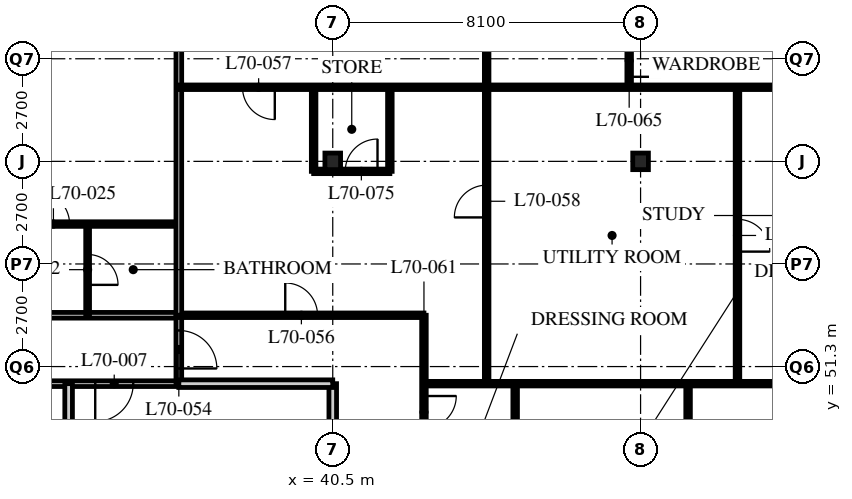
"""IFC4 building model, lengths in metres.
Left out: names, types, materials, properties, quantities, classifications, styles, units other than length and angle.
Written with IfcOpenShell. Run it as: python <this file> out.ifc"""

import sys

from ifc_helpers import new_model, si_unit, direction, frame, frame_2d, origin, origin_2d, place, context, subcontext, project, spatial, rectangle, i_section, extrude, element, fill, save


model = new_model("IFC4")
c1 = context("Model", 3, precision=1e-05, world=origin(), true_north=direction((0.0, 1.0)))
c2 = subcontext(c1, "Body", "Model", "MODEL_VIEW")
j1 = project(units=[si_unit("LENGTHUNIT", "METRE"), si_unit("PLANEANGLEUNIT", "RADIAN")], contexts=[c1])
p1 = place(None, origin())
s1 = spatial("IfcSite", under=j1, at=p1, CompositionType="ELEMENT")
p2 = place(p1, origin())
s2 = spatial("IfcBuilding", under=s1, at=p2, CompositionType="ELEMENT")
p3 = place(p2, frame((0.0, 0.0, 273.6)))
s3 = spatial("IfcBuildingStorey", under=s2, at=p3, CompositionType="ELEMENT", Elevation=273.6)
for number, where, z_axis, x_axis in (
    (1, (40.5, 56.7, 0.0), (0.0, 0.0, 1.0), (1.0, 0.0, 0.0)),
    (2, (48.6, 56.7, 0.0), (0.0, 0.0, 1.0), (1.0, 0.0, 0.0)),
):
    element("IfcColumn", number, at=place(p3, frame(where, z_axis=z_axis, x_axis=x_axis)), inside=s3, PredefinedType="COLUMN", context=c2, shape_type="SweptSolid", body=[
        extrude(i_section(OverallWidth=0.412, OverallDepth=0.437, WebThickness=0.036, FlangeThickness=0.058, FilletRadius=0.015, at=origin_2d()), origin(), (0.0, 0.0, 1.0), 3.9),
    ])
p4 = place(p3, frame((12.15, 52.65, 0.0), z_axis=(0.0, 0.0, 1.0), x_axis=(1.0, 0.0, 0.0)))
e3 = element("IfcWall", 3, at=p4, inside=s3, PredefinedType="PARTITIONING", context=c2, shape_type="SweptSolid", body=[
    extrude(rectangle(XDim=24.3, YDim=0.15, at=frame_2d((12.15, 0.0))), origin(), (0.0, 0.0, 1.0), 3.69),
])
p5 = place(p4, frame((6.4, 0.0, 0.0)))
e4 = element("IfcOpeningElement", 4, at=p5, cuts=e3, PredefinedType="OPENING", context=c2, shape_type="SweptSolid", body=[
    extrude(rectangle(XDim=1.0, YDim=2.1, at=frame_2d((0.5, 1.05))), frame((0.0, 0.085, 0.0), z_axis=(0.0, -1.0, 0.0), x_axis=(1.0, 0.0, 0.0)), (0.0, 0.0, 1.0), 0.17),
])
p6 = place(p4, frame((8.5, 0.0, 0.0)))
e5 = element("IfcOpeningElement", 5, at=p6, cuts=e3, PredefinedType="OPENING", context=c2, shape_type="SweptSolid", body=[
    extrude(rectangle(XDim=1.0, YDim=2.1, at=frame_2d((0.5, 1.05))), frame((0.0, 0.085, 0.0), z_axis=(0.0, -1.0, 0.0), x_axis=(1.0, 0.0, 0.0)), (0.0, 0.0, 1.0), 0.17),
])
p7 = place(p4, frame((16.6, 0.0, 0.0)))
e6 = element("IfcOpeningElement", 6, at=p7, cuts=e3, PredefinedType="OPENING", context=c2, shape_type="SweptSolid", body=[
    extrude(rectangle(XDim=1.0, YDim=2.1, at=frame_2d((0.5, 1.05))), frame((0.0, 0.085, 0.0), z_axis=(0.0, -1.0, 0.0), x_axis=(1.0, 0.0, 0.0)), (0.0, 0.0, 1.0), 0.17),
])
p8 = place(p4, frame((1.525, 0.0, 0.0)))
e7 = element("IfcOpeningElement", 7, at=p8, cuts=e3, PredefinedType="OPENING", context=c2, shape_type="SweptSolid", body=[
    extrude(rectangle(XDim=1.0, YDim=2.1, at=frame_2d((0.5, 1.05))), frame((0.0, 0.085, 0.0), z_axis=(0.0, -1.0, 0.0), x_axis=(1.0, 0.0, 0.0)), (0.0, 0.0, 1.0), 0.17),
])
p9 = place(p3, frame((29.56, 50.85, 0.0), z_axis=(0.0, 0.0, 1.0), x_axis=(1.0, 0.0, 0.0)))
e8 = element("IfcWall", 8, at=p9, inside=s3, PredefinedType="PARTITIONING", context=c2, shape_type="SweptSolid", body=[
    extrude(rectangle(XDim=6.89, YDim=0.15, at=frame_2d((3.445, 0.0))), origin(), (0.0, 0.0, 1.0), 3.69),
])
p10 = place(p9, frame((1.49, 0.0, 0.0)))
e9 = element("IfcOpeningElement", 9, at=p10, cuts=e8, PredefinedType="OPENING", context=c2, shape_type="SweptSolid", body=[
    extrude(rectangle(XDim=1.0, YDim=2.1, at=frame_2d((0.5, 1.05))), frame((0.0, 0.085, 0.0), z_axis=(0.0, -1.0, 0.0), x_axis=(1.0, 0.0, 0.0)), (0.0, 0.0, 1.0), 0.17),
])
p11 = place(p9, frame((4.69, 0.0, 0.0)))
e10 = element("IfcOpeningElement", 10, at=p11, cuts=e8, PredefinedType="OPENING", context=c2, shape_type="SweptSolid", body=[
    extrude(rectangle(XDim=1.0, YDim=2.1, at=frame_2d((0.5, 1.05))), frame((0.0, 0.085, 0.0), z_axis=(0.0, -1.0, 0.0), x_axis=(1.0, 0.0, 0.0)), (0.0, 0.0, 1.0), 0.17),
])
p12 = place(p3, frame((33.55, 50.85, 0.0), z_axis=(0.0, 0.0, 1.0), x_axis=(0.0, -1.0, 0.0)))
e11 = element("IfcWall", 11, at=p12, inside=s3, PredefinedType="SOLIDWALL", context=c2, shape_type="SweptSolid", body=[
    extrude(rectangle(XDim=3.0, YDim=0.2, at=frame_2d((1.5, 0.0))), origin(), (0.0, 0.0, 1.0), 3.69),
])
p13 = place(p3, frame((36.45, 50.85, 0.0), z_axis=(0.0, 0.0, 1.0), x_axis=(0.0, 1.0, 0.0)))
e12 = element("IfcWall", 12, at=p13, inside=s3, PredefinedType="PARTITIONING", context=c2, shape_type="SweptSolid", body=[
    extrude(rectangle(XDim=1.8, YDim=0.15, at=frame_2d((0.9, 0.0))), origin(), (0.0, 0.0, 1.0), 3.69),
])
p14 = place(p13, frame((0.4, 0.0, 0.0)))
e13 = element("IfcOpeningElement", 13, at=p14, cuts=e12, PredefinedType="OPENING", context=c2, shape_type="SweptSolid", body=[
    extrude(rectangle(XDim=1.0, YDim=2.1, at=frame_2d((0.5, 1.05))), frame((0.0, 0.085, 0.0), z_axis=(0.0, -1.0, 0.0), x_axis=(1.0, 0.0, 0.0)), (0.0, 0.0, 1.0), 0.17),
])
p15 = place(p3, frame((40.5, 40.5, 0.0), z_axis=(0.0, 0.0, 1.0), x_axis=(0.0, 1.0, 0.0)))
e14 = element("IfcWall", 14, at=p15, inside=s3, PredefinedType="SOLIDWALL", context=c2, shape_type="SweptSolid", body=[
    extrude(rectangle(XDim=10.35, YDim=0.2, at=frame_2d((5.175, 0.0))), origin(), (0.0, 0.0, 1.0), 3.078),
])
p16 = place(p3, frame((20.25, 55.05, 0.0), z_axis=(0.0, 0.0, 1.0), x_axis=(1.0, 0.0, 0.0)))
e15 = element("IfcWall", 15, at=p16, inside=s3, PredefinedType="PARTITIONING", context=c2, shape_type="SweptSolid", body=[
    extrude(rectangle(XDim=16.2, YDim=0.12, at=frame_2d((8.1, 0.0))), origin(), (0.0, 0.0, 1.0), 3.69),
])
p17 = place(p16, frame((0.975, 0.0, 0.0)))
e16 = element("IfcOpeningElement", 16, at=p17, cuts=e15, PredefinedType="OPENING", context=c2, shape_type="SweptSolid", body=[
    extrude(rectangle(XDim=0.85, YDim=2.1, at=frame_2d((0.425, 1.05))), frame((0.0, 0.07, 0.0), z_axis=(0.0, -1.0, 0.0), x_axis=(1.0, 0.0, 0.0)), (0.0, 0.0, 1.0), 0.14),
])
p18 = place(p16, frame((4.375, 0.0, 0.0)))
e17 = element("IfcOpeningElement", 17, at=p18, cuts=e15, PredefinedType="OPENING", context=c2, shape_type="SweptSolid", body=[
    extrude(rectangle(XDim=0.85, YDim=2.1, at=frame_2d((0.425, 1.05))), frame((0.0, 0.07, 0.0), z_axis=(0.0, -1.0, 0.0), x_axis=(1.0, 0.0, 0.0)), (0.0, 0.0, 1.0), 0.14),
])
p19 = place(p16, frame((9.075, 0.0, 0.0)))
e18 = element("IfcOpeningElement", 18, at=p19, cuts=e15, PredefinedType="OPENING", context=c2, shape_type="SweptSolid", body=[
    extrude(rectangle(XDim=0.85, YDim=2.1, at=frame_2d((0.425, 1.05))), frame((0.0, 0.07, 0.0), z_axis=(0.0, -1.0, 0.0), x_axis=(1.0, 0.0, 0.0)), (0.0, 0.0, 1.0), 0.14),
])
p20 = place(p16, frame((12.475, 0.0, 0.0)))
e19 = element("IfcOpeningElement", 19, at=p20, cuts=e15, PredefinedType="OPENING", context=c2, shape_type="SweptSolid", body=[
    extrude(rectangle(XDim=0.85, YDim=2.1, at=frame_2d((0.425, 1.05))), frame((0.0, 0.07, 0.0), z_axis=(0.0, -1.0, 0.0), x_axis=(1.0, 0.0, 0.0)), (0.0, 0.0, 1.0), 0.14),
])
p21 = place(p3, frame((34.05, 52.65, 0.0), z_axis=(0.0, 0.0, 1.0), x_axis=(0.0, 1.0, 0.0)))
e20 = element("IfcWall", 20, at=p21, inside=s3, PredefinedType="PARTITIONING", context=c2, shape_type="SweptSolid", body=[
    extrude(rectangle(XDim=2.4, YDim=0.1, at=frame_2d((1.2, 0.0))), origin(), (0.0, 0.0, 1.0), 3.69),
])
p22 = place(p21, frame((0.8, 0.0, 0.0)))
e21 = element("IfcOpeningElement", 21, at=p22, cuts=e20, PredefinedType="OPENING", context=c2, shape_type="SweptSolid", body=[
    extrude(rectangle(XDim=0.8, YDim=2.1, at=frame_2d((0.4, 1.05))), frame((0.0, 0.06, 0.0), z_axis=(0.0, -1.0, 0.0), x_axis=(1.0, 0.0, 0.0)), (0.0, 0.0, 1.0), 0.12),
])
p23 = place(p3, frame((42.9, 52.65, 0.0), z_axis=(0.0, 0.0, 1.0), x_axis=(0.0, -1.0, 0.0)))
e22 = element("IfcWall", 22, at=p23, inside=s3, PredefinedType="PARTITIONING", context=c2, shape_type="SweptSolid", body=[
    extrude(rectangle(XDim=12.15, YDim=0.12, at=frame_2d((6.075, 0.0))), origin(), (0.0, 0.0, 1.0), 3.69),
])
p24 = place(p23, frame((2.125, 0.0, 0.0)))
e23 = element("IfcOpeningElement", 23, at=p24, cuts=e22, PredefinedType="OPENING", context=c2, shape_type="SweptSolid", body=[
    extrude(rectangle(XDim=0.85, YDim=2.1, at=frame_2d((0.425, 1.05))), frame((0.0, 0.07, 0.0), z_axis=(0.0, -1.0, 0.0), x_axis=(1.0, 0.0, 0.0)), (0.0, 0.0, 1.0), 0.14),
])
p25 = place(p23, frame((8.425, 0.0, 0.0)))
e24 = element("IfcOpeningElement", 24, at=p25, cuts=e22, PredefinedType="OPENING", context=c2, shape_type="SweptSolid", body=[
    extrude(rectangle(XDim=0.85, YDim=2.1, at=frame_2d((0.425, 1.05))), frame((0.0, 0.07, 0.0), z_axis=(0.0, -1.0, 0.0), x_axis=(1.0, 0.0, 0.0)), (0.0, 0.0, 1.0), 0.14),
])
p26 = place(p3, frame((36.45, 52.65, 0.0), z_axis=(0.0, 0.0, 1.0), x_axis=(1.0, 0.0, 0.0)))
e25 = element("IfcWall", 25, at=p26, inside=s3, PredefinedType="PARTITIONING", context=c2, shape_type="SweptSolid", body=[
    extrude(rectangle(XDim=6.45, YDim=0.12, at=frame_2d((3.225, 0.0))), origin(), (0.0, 0.0, 1.0), 3.69),
])
p27 = place(p26, frame((2.8, 0.0, 0.0)))
e26 = element("IfcOpeningElement", 26, at=p27, cuts=e25, PredefinedType="OPENING", context=c2, shape_type="SweptSolid", body=[
    extrude(rectangle(XDim=0.85, YDim=2.1, at=frame_2d((0.425, 1.05))), frame((0.0, 0.07, 0.0), z_axis=(0.0, -1.0, 0.0), x_axis=(1.0, 0.0, 0.0)), (0.0, 0.0, 1.0), 0.14),
])
p28 = place(p3, frame((36.45, 50.85, 0.0), z_axis=(0.0, 0.0, 1.0), x_axis=(1.0, 0.0, 0.0)))
e27 = element("IfcWall", 27, at=p28, inside=s3, PredefinedType="SOLIDWALL", context=c2, shape_type="SweptSolid", body=[
    extrude(rectangle(XDim=4.05, YDim=0.2, at=frame_2d((2.025, 0.0))), origin(), (0.0, 0.0, 1.0), 3.69),
])
p29 = place(p3, frame((42.9, 50.85, 0.0), z_axis=(0.0, 0.0, 1.0), x_axis=(1.0, 0.0, 0.0)))
e28 = element("IfcWall", 28, at=p29, inside=s3, PredefinedType="PARTITIONING", context=c2, shape_type="SweptSolid", body=[
    extrude(rectangle(XDim=13.5, YDim=0.12, at=frame_2d((6.75, 0.0))), origin(), (0.0, 0.0, 1.0), 3.69),
])
p30 = place(p3, frame((36.45, 64.5, 0.0), z_axis=(0.0, 0.0, 1.0), x_axis=(0.0, -1.0, 0.0)))
e29 = element("IfcWall", 29, at=p30, inside=s3, PredefinedType="PARTITIONING", context=c2, shape_type="SweptSolid", body=[
    extrude(rectangle(XDim=11.85, YDim=0.15, at=frame_2d((5.925, 0.0))), origin(), (0.0, 0.0, 1.0), 3.69),
])
p31 = place(p3, frame((36.45, 58.65, 0.0), z_axis=(0.0, 0.0, 1.0), x_axis=(1.0, 0.0, 0.0)))
e30 = element("IfcWall", 30, at=p31, inside=s3, PredefinedType="PARTITIONING", context=c2, shape_type="SweptSolid", body=[
    extrude(rectangle(XDim=15.9, YDim=0.12, at=frame_2d((7.95, 0.0))), origin(), (0.0, 0.0, 1.0), 3.69),
])
p32 = place(p31, frame((1.675, 0.0, 0.0)))
e31 = element("IfcOpeningElement", 31, at=p32, cuts=e30, PredefinedType="OPENING", context=c2, shape_type="SweptSolid", body=[
    extrude(rectangle(XDim=0.85, YDim=2.1, at=frame_2d((0.425, 1.05))), frame((0.0, 0.07, 0.0), z_axis=(0.0, -1.0, 0.0), x_axis=(1.0, 0.0, 0.0)), (0.0, 0.0, 1.0), 0.14),
])
p33 = place(p3, frame((44.55, 64.5, 0.0), z_axis=(0.0, 0.0, 1.0), x_axis=(0.0, -1.0, 0.0)))
e32 = element("IfcWall", 32, at=p33, inside=s3, PredefinedType="PARTITIONING", context=c2, shape_type="SweptSolid", body=[
    extrude(rectangle(XDim=13.65, YDim=0.12, at=frame_2d((6.825, 0.0))), origin(), (0.0, 0.0, 1.0), 3.69),
])
p34 = place(p33, frame((8.425, 0.0, 0.0)))
e33 = element("IfcOpeningElement", 33, at=p34, cuts=e32, PredefinedType="OPENING", context=c2, shape_type="SweptSolid", body=[
    extrude(rectangle(XDim=0.85, YDim=2.1, at=frame_2d((0.425, 1.05))), frame((0.0, 0.07, 0.0), z_axis=(0.0, -1.0, 0.0), x_axis=(1.0, 0.0, 0.0)), (0.0, 0.0, 1.0), 0.14),
])
p35 = place(p33, frame((2.5, 0.0, 0.0)))
e34 = element("IfcOpeningElement", 34, at=p35, cuts=e32, PredefinedType="OPENING", context=c2, shape_type="SweptSolid", body=[
    extrude(rectangle(XDim=0.85, YDim=2.1, at=frame_2d((0.425, 1.05))), frame((0.0, 0.07, 0.0), z_axis=(0.0, -1.0, 0.0), x_axis=(1.0, 0.0, 0.0)), (0.0, 0.0, 1.0), 0.14),
])
p36 = place(p3, frame((48.3, 58.65, 0.0), z_axis=(0.0, 0.0, 1.0), x_axis=(0.0, 1.0, 0.0)))
e35 = element("IfcWall", 35, at=p36, inside=s3, PredefinedType="PARTITIONING", context=c2, shape_type="SweptSolid", body=[
    extrude(rectangle(XDim=1.8, YDim=0.12, at=frame_2d((0.9, 0.0))), origin(), (0.0, 0.0, 1.0), 3.69),
])
p37 = place(p36, frame((0.275, 0.0, 0.0)))
e36 = element("IfcOpeningElement", 36, at=p37, cuts=e35, PredefinedType="OPENING", context=c2, shape_type="SweptSolid", body=[
    extrude(rectangle(XDim=0.85, YDim=2.1, at=frame_2d((0.425, 1.05))), frame((0.0, 0.07, 0.0), z_axis=(0.0, -1.0, 0.0), x_axis=(1.0, 0.0, 0.0)), (0.0, 0.0, 1.0), 0.14),
])
p38 = place(p3, frame((45.3, 50.85, 0.0), z_axis=(0.0, 0.0, 1.0), x_axis=(0.0, -1.0, 0.0)))
e37 = element("IfcWall", 37, at=p38, inside=s3, PredefinedType="PARTITIONING", context=c2, shape_type="SweptSolid", body=[
    extrude(rectangle(XDim=4.01, YDim=0.12, at=frame_2d((2.005, 0.0))), origin(), (0.0, 0.0, 1.0), 3.69),
])
p39 = place(p38, frame((2.885, 0.0, 0.0)))
e38 = element("IfcOpeningElement", 38, at=p39, cuts=e37, PredefinedType="OPENING", context=c2, shape_type="SweptSolid", body=[
    extrude(rectangle(XDim=0.85, YDim=2.1, at=frame_2d((0.425, 1.05))), frame((0.0, 0.07, 0.0), z_axis=(0.0, -1.0, 0.0), x_axis=(1.0, 0.0, 0.0)), (0.0, 0.0, 1.0), 0.14),
])
p40 = place(p3, frame((51.15, 50.85, 0.0), z_axis=(0.0, 0.0, 1.0), x_axis=(0.0, 1.0, 0.0)))
e39 = element("IfcWall", 39, at=p40, inside=s3, PredefinedType="PARTITIONING", context=c2, shape_type="SweptSolid", body=[
    extrude(rectangle(XDim=7.8, YDim=0.12, at=frame_2d((3.9, 0.0))), origin(), (0.0, 0.0, 1.0), 3.69),
])
p41 = place(p40, frame((3.475, 0.0, 0.0)))
e40 = element("IfcOpeningElement", 40, at=p41, cuts=e39, PredefinedType="OPENING", context=c2, shape_type="SweptSolid", body=[
    extrude(rectangle(XDim=0.85, YDim=2.1, at=frame_2d((0.425, 1.05))), frame((0.0, 0.07, 0.0), z_axis=(0.0, -1.0, 0.0), x_axis=(1.0, 0.0, 0.0)), (0.0, 0.0, 1.0), 0.14),
])
p42 = place(p3, frame((49.85, 44.55, 0.0), z_axis=(0.0, 0.0, 1.0), x_axis=(0.0, 1.0, 0.0)))
e41 = element("IfcWall", 41, at=p42, inside=s3, PredefinedType="PARTITIONING", context=c2, shape_type="SweptSolid", body=[
    extrude(rectangle(XDim=6.3, YDim=0.12, at=frame_2d((3.15, 0.0))), origin(), (0.0, 0.0, 1.0), 3.69),
])
p43 = place(p42, frame((2.725, 0.0, 0.0)))
e42 = element("IfcOpeningElement", 42, at=p43, cuts=e41, PredefinedType="OPENING", context=c2, shape_type="SweptSolid", body=[
    extrude(rectangle(XDim=0.85, YDim=2.1, at=frame_2d((0.425, 1.05))), frame((0.0, 0.07, 0.0), z_axis=(0.0, -1.0, 0.0), x_axis=(1.0, 0.0, 0.0)), (0.0, 0.0, 1.0), 0.14),
])
for number, where, z_axis, x_axis in (
    (43, (39.997, 58.65, 0.0), (0.0, 0.0, 1.0), (0.0, -1.0, 0.0)),
    (44, (42.003, 58.65, 0.0), (0.0, 0.0, 1.0), (0.0, -1.0, 0.0)),
):
    element("IfcWall", number, at=place(p3, frame(where, z_axis=z_axis, x_axis=x_axis)), inside=s3, PredefinedType="PARTITIONING", context=c2, shape_type="SweptSolid", body=[
        extrude(rectangle(XDim=2.213, YDim=0.12, at=frame_2d((1.106, 0.0))), origin(), (0.0, 0.0, 1.0), 3.69),
    ])
p44 = place(p3, frame((39.997, 56.437, 0.0), z_axis=(0.0, 0.0, 1.0), x_axis=(1.0, 0.0, 0.0)))
e45 = element("IfcWall", 45, at=p44, inside=s3, PredefinedType="PARTITIONING", context=c2, shape_type="SweptSolid", body=[
    extrude(rectangle(XDim=2.006, YDim=0.12, at=frame_2d((1.003, 0.0))), origin(), (0.0, 0.0, 1.0), 3.69),
])
p45 = place(p44, frame((0.831, 0.0, 0.0)))
e46 = element("IfcOpeningElement", 46, at=p45, cuts=e45, PredefinedType="OPENING", context=c2, shape_type="SweptSolid", body=[
    extrude(rectangle(XDim=0.85, YDim=2.1, at=frame_2d((0.425, 1.05))), frame((0.0, 0.07, 0.0), z_axis=(0.0, -1.0, 0.0), x_axis=(1.0, 0.0, 0.0)), (0.0, 0.0, 1.0), 0.14),
])
p46 = place(p11, origin())
e47 = element("IfcDoor", 47, at=p46, inside=s3, OperationType="SINGLE_SWING_RIGHT", PredefinedType="DOOR", context=c2, shape_type="SweptSolid", body=[
    extrude(rectangle(XDim=1.0, YDim=2.1, at=frame_2d((0.5, 1.05))), frame((0.0, 0.025, 0.0), z_axis=(0.0, -1.0, 0.0), x_axis=(1.0, 0.0, 0.0)), (0.0, 0.0, 1.0), 0.05),
])
fill(e10, e47)
p47 = place(p22, origin())
e48 = element("IfcDoor", 48, at=p47, inside=s3, OperationType="SINGLE_SWING_RIGHT", PredefinedType="DOOR", context=c2, shape_type="SweptSolid", body=[
    extrude(rectangle(XDim=0.8, YDim=2.1, at=frame_2d((0.4, 1.05))), frame((0.0, 0.025, 0.0), z_axis=(0.0, -1.0, 0.0), x_axis=(1.0, 0.0, 0.0)), (0.0, 0.0, 1.0), 0.05),
])
fill(e21, e48)
p48 = place(p20, origin())
e49 = element("IfcDoor", 49, at=p48, inside=s3, OperationType="SINGLE_SWING_LEFT", PredefinedType="DOOR", context=c2, shape_type="SweptSolid", body=[
    extrude(rectangle(XDim=0.85, YDim=2.1, at=frame_2d((0.425, 1.05))), frame((0.0, 0.025, 0.0), z_axis=(0.0, -1.0, 0.0), x_axis=(1.0, 0.0, 0.0)), (0.0, 0.0, 1.0), 0.05),
])
fill(e19, e49)
p49 = place(p14, origin())
e50 = element("IfcDoor", 50, at=p49, inside=s3, OperationType="SINGLE_SWING_RIGHT", PredefinedType="DOOR", context=c2, shape_type="SweptSolid", body=[
    extrude(rectangle(XDim=1.0, YDim=2.1, at=frame_2d((0.5, 1.05))), frame((0.0, 0.025, 0.0), z_axis=(0.0, -1.0, 0.0), x_axis=(1.0, 0.0, 0.0)), (0.0, 0.0, 1.0), 0.05),
])
fill(e13, e50)
p50 = place(p27, origin())
e51 = element("IfcDoor", 51, at=p50, inside=s3, OperationType="SINGLE_SWING_LEFT", PredefinedType="DOOR", context=c2, shape_type="SweptSolid", body=[
    extrude(rectangle(XDim=0.85, YDim=2.1, at=frame_2d((0.425, 1.05))), frame((0.0, 0.025, 0.0), z_axis=(0.0, -1.0, 0.0), x_axis=(1.0, 0.0, 0.0)), (0.0, 0.0, 1.0), 0.05),
])
fill(e26, e51)
p51 = place(p32, origin())
e52 = element("IfcDoor", 52, at=p51, inside=s3, OperationType="SINGLE_SWING_LEFT", PredefinedType="DOOR", context=c2, shape_type="SweptSolid", body=[
    extrude(rectangle(XDim=0.85, YDim=2.1, at=frame_2d((0.425, 1.05))), frame((0.0, 0.025, 0.0), z_axis=(0.0, -1.0, 0.0), x_axis=(1.0, 0.0, 0.0)), (0.0, 0.0, 1.0), 0.05),
])
fill(e31, e52)
p52 = place(p34, origin())
e53 = element("IfcDoor", 53, at=p52, inside=s3, OperationType="SINGLE_SWING_LEFT", PredefinedType="DOOR", context=c2, shape_type="SweptSolid", body=[
    extrude(rectangle(XDim=0.85, YDim=2.1, at=frame_2d((0.425, 1.05))), frame((0.0, 0.025, 0.0), z_axis=(0.0, -1.0, 0.0), x_axis=(1.0, 0.0, 0.0)), (0.0, 0.0, 1.0), 0.05),
])
fill(e33, e53)
p53 = place(p24, origin())
e54 = element("IfcDoor", 54, at=p53, inside=s3, OperationType="SINGLE_SWING_LEFT", PredefinedType="DOOR", context=c2, shape_type="SweptSolid", body=[
    extrude(rectangle(XDim=0.85, YDim=2.1, at=frame_2d((0.425, 1.05))), frame((0.0, 0.025, 0.0), z_axis=(0.0, -1.0, 0.0), x_axis=(1.0, 0.0, 0.0)), (0.0, 0.0, 1.0), 0.05),
])
fill(e23, e54)
p54 = place(p37, origin())
e55 = element("IfcDoor", 55, at=p54, inside=s3, OperationType="SINGLE_SWING_RIGHT", PredefinedType="DOOR", context=c2, shape_type="SweptSolid", body=[
    extrude(rectangle(XDim=0.85, YDim=2.1, at=frame_2d((0.425, 1.05))), frame((0.0, 0.025, 0.0), z_axis=(0.0, -1.0, 0.0), x_axis=(1.0, 0.0, 0.0)), (0.0, 0.0, 1.0), 0.05),
])
fill(e36, e55)
p55 = place(p41, origin())
e56 = element("IfcDoor", 56, at=p55, inside=s3, OperationType="SINGLE_SWING_RIGHT", PredefinedType="DOOR", context=c2, shape_type="SweptSolid", body=[
    extrude(rectangle(XDim=0.85, YDim=2.1, at=frame_2d((0.425, 1.05))), frame((0.0, 0.025, 0.0), z_axis=(0.0, -1.0, 0.0), x_axis=(1.0, 0.0, 0.0)), (0.0, 0.0, 1.0), 0.05),
])
fill(e40, e56)
p56 = place(p45, origin())
e57 = element("IfcDoor", 57, at=p56, inside=s3, OperationType="SINGLE_SWING_RIGHT", PredefinedType="DOOR", context=c2, shape_type="SweptSolid", body=[
    extrude(rectangle(XDim=0.85, YDim=2.1, at=frame_2d((0.425, 1.05))), frame((0.0, 0.025, 0.0), z_axis=(0.0, -1.0, 0.0), x_axis=(1.0, 0.0, 0.0)), (0.0, 0.0, 1.0), 0.05),
])
fill(e46, e57)
save(model, sys.argv[1])
